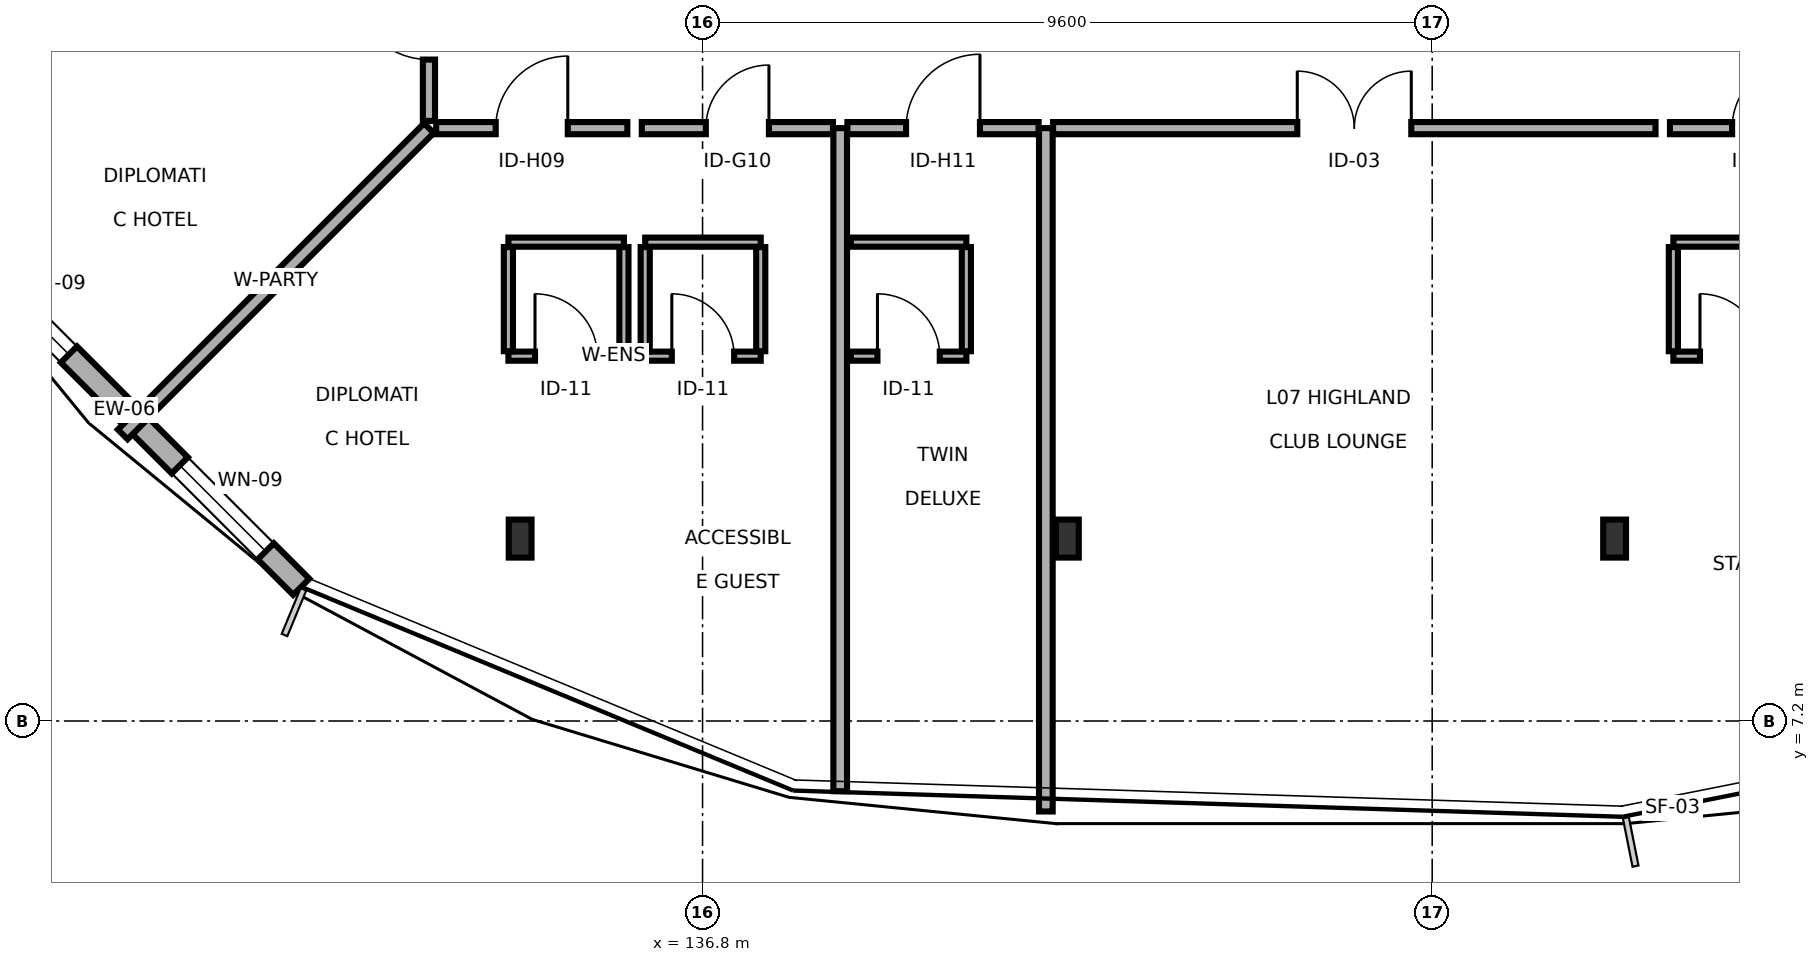
"""IFC4 building model, lengths in metres.
Left out: names, types, materials, properties, quantities, classifications, styles, units other than length and angle.
Written with IfcOpenShell. Run it as: python <this file> out.ifc"""

import sys

from ifc_helpers import new_model, si_unit, direction, frame, frame_2d, origin, origin_2d, place, context, subcontext, project, spatial, rectangle, i_section, extrude, element, fill, save


model = new_model("IFC4")
c1 = context("Model", 3, precision=1e-05, world=origin(), true_north=direction((0.0, 1.0)))
c2 = subcontext(c1, "Body", "Model", "MODEL_VIEW")
j1 = project(units=[si_unit("LENGTHUNIT", "METRE"), si_unit("PLANEANGLEUNIT", "RADIAN")], contexts=[c1])
p1 = place(None, origin())
s1 = spatial("IfcSite", under=j1, at=p1, CompositionType="ELEMENT")
p2 = place(p1, origin())
s2 = spatial("IfcBuilding", under=s1, at=p2, CompositionType="ELEMENT")
p3 = place(p2, frame((0.0, 0.0, 24.9)))
s3 = spatial("IfcBuildingStorey", under=s2, at=p3, CompositionType="ELEMENT", Elevation=24.9)
for number, where, z_axis, x_axis in (
    (1, (134.4, 9.6, 0.0), (0.0, 0.0, 1.0), (1.0, 0.0, 0.0)),
    (2, (141.6, 9.6, 0.0), (0.0, 0.0, 1.0), (1.0, 0.0, 0.0)),
    (3, (148.8, 9.6, 0.0), (0.0, 0.0, 1.0), (1.0, 0.0, 0.0)),
):
    element("IfcColumn", number, at=place(p3, frame(where, z_axis=z_axis, x_axis=x_axis)), inside=s3, PredefinedType="COLUMN", context=c2, shape_type="SweptSolid", body=[
        extrude(i_section(OverallWidth=0.3, OverallDepth=0.5, WebThickness=0.014, FlangeThickness=0.028, FilletRadius=0.027, at=origin_2d()), origin(), (0.0, 0.0, 1.0), 3.4),
    ])
p4 = place(p3, frame((126.566, 13.92, 0.0), z_axis=(0.0, 0.0, 1.0), x_axis=(0.707124205549, -0.707089356394, 0.0)))
e4 = element("IfcWall", 4, at=p4, inside=s3, PredefinedType="SOLIDWALL", context=c2, shape_type="SweptSolid", body=[
    extrude(rectangle(XDim=7.006, YDim=0.3, at=frame_2d((3.503, 0.0))), origin(), (0.0, 0.0, 1.0), 3.19),
])
p5 = place(p4, frame((4.746, 0.0, 0.8)))
e5 = element("IfcOpeningElement", 5, at=p5, cuts=e4, PredefinedType="OPENING", context=c2, shape_type="SweptSolid", body=[
    extrude(rectangle(XDim=1.6, YDim=1.5, at=frame_2d((0.8, 0.75))), frame((0.0, 0.16, 0.0), z_axis=(0.0, -1.0, 0.0), x_axis=(1.0, 0.0, 0.0)), (0.0, 0.0, 1.0), 0.32),
])
p6 = place(p4, frame((1.083, 0.0, 0.8)))
e6 = element("IfcOpeningElement", 6, at=p6, cuts=e4, PredefinedType="OPENING", context=c2, shape_type="SweptSolid", body=[
    extrude(rectangle(XDim=1.6, YDim=1.5, at=frame_2d((0.8, 0.75))), frame((0.0, 0.16, 0.0), z_axis=(0.0, -1.0, 0.0), x_axis=(1.0, 0.0, 0.0)), (0.0, 0.0, 1.0), 0.32),
])
p7 = place(p3, frame((141.412, 15.0, 0.0), z_axis=(0.0, 0.0, 1.0), x_axis=(1.0, 0.0, 0.0)))
e7 = element("IfcWall", 7, at=p7, inside=s3, PredefinedType="PARTITIONING", context=c2, shape_type="SweptSolid", body=[
    extrude(rectangle(XDim=7.927, YDim=0.16, at=frame_2d((3.963, 0.0))), origin(), (0.0, 0.0, 1.0), 2.725),
])
p8 = place(p7, frame((3.213, 0.0, 0.0)))
e8 = element("IfcOpeningElement", 8, at=p8, cuts=e7, PredefinedType="OPENING", context=c2, shape_type="SweptSolid", body=[
    extrude(rectangle(XDim=1.5, YDim=2.25, at=frame_2d((0.75, 1.125))), frame((0.0, 0.09, 0.0), z_axis=(0.0, -1.0, 0.0), x_axis=(1.0, 0.0, 0.0)), (0.0, 0.0, 1.0), 0.18),
])
p9 = place(p3, frame((133.295, 15.0, 0.0), z_axis=(0.0, 0.0, 1.0), x_axis=(1.0, 0.0, 0.0)))
e9 = element("IfcWall", 9, at=p9, inside=s3, PredefinedType="PARTITIONING", context=c2, shape_type="SweptSolid", body=[
    extrude(rectangle(XDim=2.516, YDim=0.16, at=frame_2d((1.258, 0.0))), origin(), (0.0, 0.0, 1.0), 3.19),
])
p10 = place(p9, frame((0.784, 0.0, 0.0)))
e10 = element("IfcOpeningElement", 10, at=p10, cuts=e9, PredefinedType="OPENING", context=c2, shape_type="SweptSolid", body=[
    extrude(rectangle(XDim=0.948, YDim=2.1, at=frame_2d((0.474, 1.05))), frame((0.0, 0.09, 0.0), z_axis=(0.0, -1.0, 0.0), x_axis=(1.0, 0.0, 0.0)), (0.0, 0.0, 1.0), 0.18),
])
p11 = place(p3, frame((134.246, 12.0, 0.0), z_axis=(0.0, 0.0, 1.0), x_axis=(1.0, 0.0, 0.0)))
e11 = element("IfcWall", 11, at=p11, inside=s3, PredefinedType="PARTITIONING", context=c2, shape_type="SweptSolid", body=[
    extrude(rectangle(XDim=1.52, YDim=0.12, at=frame_2d((0.76, 0.0))), origin(), (0.0, 0.0, 1.0), 2.725),
])
p12 = place(p11, frame((0.35, 0.0, 0.0)))
e12 = element("IfcOpeningElement", 12, at=p12, cuts=e11, PredefinedType="OPENING", context=c2, shape_type="SweptSolid", body=[
    extrude(rectangle(XDim=0.82, YDim=2.08, at=frame_2d((0.41, 1.04))), frame((0.0, 0.07, 0.0), z_axis=(0.0, -1.0, 0.0), x_axis=(1.0, 0.0, 0.0)), (0.0, 0.0, 1.0), 0.14),
])
p13 = place(p3, frame((134.246, 13.5, 0.0), z_axis=(0.0, 0.0, 1.0), x_axis=(1.0, 0.0, 0.0)))
e13 = element("IfcWall", 13, at=p13, inside=s3, PredefinedType="PARTITIONING", context=c2, shape_type="SweptSolid", body=[
    extrude(rectangle(XDim=1.52, YDim=0.12, at=frame_2d((0.76, 0.0))), origin(), (0.0, 0.0, 1.0), 2.725),
])
p14 = place(p3, frame((134.246, 12.065, 0.0), z_axis=(0.0, 0.0, 1.0), x_axis=(0.0, 1.0, 0.0)))
e14 = element("IfcWall", 14, at=p14, inside=s3, PredefinedType="PARTITIONING", context=c2, shape_type="SweptSolid", body=[
    extrude(rectangle(XDim=1.37, YDim=0.12, at=frame_2d((0.685, 0.0))), origin(), (0.0, 0.0, 1.0), 3.19),
])
p15 = place(p3, frame((135.766, 12.065, 0.0), z_axis=(0.0, 0.0, 1.0), x_axis=(0.0, 1.0, 0.0)))
e15 = element("IfcWall", 15, at=p15, inside=s3, PredefinedType="PARTITIONING", context=c2, shape_type="SweptSolid", body=[
    extrude(rectangle(XDim=1.37, YDim=0.12, at=frame_2d((0.685, 0.0))), origin(), (0.0, 0.0, 1.0), 2.725),
])
p16 = place(p3, frame((133.2, 15.0, 0.0), z_axis=(0.0, 0.0, 1.0), x_axis=(-0.707106781187, -0.707106781187, 0.0)))
e16 = element("IfcWall", 16, at=p16, inside=s3, PredefinedType="PARTITIONING", context=c2, shape_type="SweptSolid", body=[
    extrude(rectangle(XDim=5.698, YDim=0.18, at=frame_2d((2.849, 0.0))), origin(), (0.0, 0.0, 1.0), 2.675),
])
p17 = place(p3, frame((136.0, 15.0, 0.0), z_axis=(0.0, 0.0, 1.0), x_axis=(1.0, 0.0, 0.0)))
e17 = element("IfcWall", 17, at=p17, inside=s3, PredefinedType="PARTITIONING", context=c2, shape_type="SweptSolid", body=[
    extrude(rectangle(XDim=2.516, YDim=0.16, at=frame_2d((1.258, 0.0))), origin(), (0.0, 0.0, 1.0), 2.725),
])
p18 = place(p17, frame((0.843, 0.0, 0.0)))
e18 = element("IfcOpeningElement", 18, at=p18, cuts=e17, PredefinedType="OPENING", context=c2, shape_type="SweptSolid", body=[
    extrude(rectangle(XDim=0.83, YDim=2.11, at=frame_2d((0.415, 1.055))), frame((0.0, 0.09, 0.0), z_axis=(0.0, -1.0, 0.0), x_axis=(1.0, 0.0, 0.0)), (0.0, 0.0, 1.0), 0.18),
])
p19 = place(p3, frame((136.046, 12.0, 0.0), z_axis=(0.0, 0.0, 1.0), x_axis=(1.0, 0.0, 0.0)))
e19 = element("IfcWall", 19, at=p19, inside=s3, PredefinedType="PARTITIONING", context=c2, shape_type="SweptSolid", body=[
    extrude(rectangle(XDim=1.52, YDim=0.12, at=frame_2d((0.76, 0.0))), origin(), (0.0, 0.0, 1.0), 3.19),
])
p20 = place(p19, frame((0.35, 0.0, 0.0)))
e20 = element("IfcOpeningElement", 20, at=p20, cuts=e19, PredefinedType="OPENING", context=c2, shape_type="SweptSolid", body=[
    extrude(rectangle(XDim=0.82, YDim=2.08, at=frame_2d((0.41, 1.04))), frame((0.0, 0.07, 0.0), z_axis=(0.0, -1.0, 0.0), x_axis=(1.0, 0.0, 0.0)), (0.0, 0.0, 1.0), 0.14),
])
p21 = place(p3, frame((136.046, 13.5, 0.0), z_axis=(0.0, 0.0, 1.0), x_axis=(1.0, 0.0, 0.0)))
e21 = element("IfcWall", 21, at=p21, inside=s3, PredefinedType="PARTITIONING", context=c2, shape_type="SweptSolid", body=[
    extrude(rectangle(XDim=1.52, YDim=0.12, at=frame_2d((0.76, 0.0))), origin(), (0.0, 0.0, 1.0), 3.19),
])
for number, where, z_axis, x_axis in (
    (22, (136.046, 12.065, 0.0), (0.0, 0.0, 1.0), (0.0, 1.0, 0.0)),
    (23, (137.566, 12.065, 0.0), (0.0, 0.0, 1.0), (0.0, 1.0, 0.0)),
):
    element("IfcWall", number, at=place(p3, frame(where, z_axis=z_axis, x_axis=x_axis)), inside=s3, PredefinedType="PARTITIONING", context=c2, shape_type="SweptSolid", body=[
        extrude(rectangle(XDim=1.37, YDim=0.12, at=frame_2d((0.685, 0.0))), origin(), (0.0, 0.0, 1.0), 3.19),
    ])
p22 = place(p3, frame((138.611, 6.277, 0.0), z_axis=(0.0, 0.0, 1.0), x_axis=(0.0, 1.0, 0.0)))
e24 = element("IfcWall", 24, at=p22, inside=s3, PredefinedType="PARTITIONING", context=c2, shape_type="SweptSolid", body=[
    extrude(rectangle(XDim=8.723, YDim=0.18, at=frame_2d((4.362, 0.0))), origin(), (0.0, 0.0, 1.0), 2.675),
])
p23 = place(p3, frame((138.706, 15.0, 0.0), z_axis=(0.0, 0.0, 1.0), x_axis=(1.0, 0.0, 0.0)))
e25 = element("IfcWall", 25, at=p23, inside=s3, PredefinedType="PARTITIONING", context=c2, shape_type="SweptSolid", body=[
    extrude(rectangle(XDim=2.516, YDim=0.16, at=frame_2d((1.258, 0.0))), origin(), (0.0, 0.0, 1.0), 3.19),
])
p24 = place(p23, frame((0.772, 0.0, 0.0)))
e26 = element("IfcOpeningElement", 26, at=p24, cuts=e25, PredefinedType="OPENING", context=c2, shape_type="SweptSolid", body=[
    extrude(rectangle(XDim=0.972, YDim=2.16, at=frame_2d((0.486, 1.08))), frame((0.0, 0.09, 0.0), z_axis=(0.0, -1.0, 0.0), x_axis=(1.0, 0.0, 0.0)), (0.0, 0.0, 1.0), 0.18),
])
p25 = place(p3, frame((138.751, 12.0, 0.0), z_axis=(0.0, 0.0, 1.0), x_axis=(1.0, 0.0, 0.0)))
e27 = element("IfcWall", 27, at=p25, inside=s3, PredefinedType="PARTITIONING", context=c2, shape_type="SweptSolid", body=[
    extrude(rectangle(XDim=1.52, YDim=0.12, at=frame_2d((0.76, 0.0))), origin(), (0.0, 0.0, 1.0), 3.19),
])
p26 = place(p25, frame((0.35, 0.0, 0.0)))
e28 = element("IfcOpeningElement", 28, at=p26, cuts=e27, PredefinedType="OPENING", context=c2, shape_type="SweptSolid", body=[
    extrude(rectangle(XDim=0.82, YDim=2.08, at=frame_2d((0.41, 1.04))), frame((0.0, 0.07, 0.0), z_axis=(0.0, -1.0, 0.0), x_axis=(1.0, 0.0, 0.0)), (0.0, 0.0, 1.0), 0.14),
])
p27 = place(p3, frame((138.751, 13.5, 0.0), z_axis=(0.0, 0.0, 1.0), x_axis=(1.0, 0.0, 0.0)))
e29 = element("IfcWall", 29, at=p27, inside=s3, PredefinedType="PARTITIONING", context=c2, shape_type="SweptSolid", body=[
    extrude(rectangle(XDim=1.52, YDim=0.12, at=frame_2d((0.76, 0.0))), origin(), (0.0, 0.0, 1.0), 3.19),
])
p28 = place(p3, frame((140.271, 12.065, 0.0), z_axis=(0.0, 0.0, 1.0), x_axis=(0.0, 1.0, 0.0)))
e30 = element("IfcWall", 30, at=p28, inside=s3, PredefinedType="PARTITIONING", context=c2, shape_type="SweptSolid", body=[
    extrude(rectangle(XDim=1.37, YDim=0.12, at=frame_2d((0.685, 0.0))), origin(), (0.0, 0.0, 1.0), 3.19),
])
p29 = place(p3, frame((141.317, 6.01, 0.0), z_axis=(0.0, 0.0, 1.0), x_axis=(0.0, 1.0, 0.0)))
e31 = element("IfcWall", 31, at=p29, inside=s3, PredefinedType="PARTITIONING", context=c2, shape_type="SweptSolid", body=[
    extrude(rectangle(XDim=8.99, YDim=0.18, at=frame_2d((4.495, 0.0))), origin(), (0.0, 0.0, 1.0), 2.675),
])
p30 = place(p3, frame((149.528, 15.0, 0.0), z_axis=(0.0, 0.0, 1.0), x_axis=(1.0, 0.0, 0.0)))
e32 = element("IfcWall", 32, at=p30, inside=s3, PredefinedType="PARTITIONING", context=c2, shape_type="SweptSolid", body=[
    extrude(rectangle(XDim=2.516, YDim=0.16, at=frame_2d((1.258, 0.0))), origin(), (0.0, 0.0, 1.0), 3.19),
])
p31 = place(p30, frame((0.818, 0.0, 0.0)))
e33 = element("IfcOpeningElement", 33, at=p31, cuts=e32, PredefinedType="OPENING", context=c2, shape_type="SweptSolid", body=[
    extrude(rectangle(XDim=0.88, YDim=2.05, at=frame_2d((0.44, 1.025))), frame((0.0, 0.09, 0.0), z_axis=(0.0, -1.0, 0.0), x_axis=(1.0, 0.0, 0.0)), (0.0, 0.0, 1.0), 0.18),
])
p32 = place(p3, frame((149.573, 12.0, 0.0), z_axis=(0.0, 0.0, 1.0), x_axis=(1.0, 0.0, 0.0)))
e34 = element("IfcWall", 34, at=p32, inside=s3, PredefinedType="PARTITIONING", context=c2, shape_type="SweptSolid", body=[
    extrude(rectangle(XDim=1.52, YDim=0.12, at=frame_2d((0.76, 0.0))), origin(), (0.0, 0.0, 1.0), 3.19),
])
p33 = place(p32, frame((0.35, 0.0, 0.0)))
e35 = element("IfcOpeningElement", 35, at=p33, cuts=e34, PredefinedType="OPENING", context=c2, shape_type="SweptSolid", body=[
    extrude(rectangle(XDim=0.82, YDim=2.08, at=frame_2d((0.41, 1.04))), frame((0.0, 0.07, 0.0), z_axis=(0.0, -1.0, 0.0), x_axis=(1.0, 0.0, 0.0)), (0.0, 0.0, 1.0), 0.14),
])
p34 = place(p3, frame((149.573, 13.5, 0.0), z_axis=(0.0, 0.0, 1.0), x_axis=(1.0, 0.0, 0.0)))
e36 = element("IfcWall", 36, at=p34, inside=s3, PredefinedType="PARTITIONING", context=c2, shape_type="SweptSolid", body=[
    extrude(rectangle(XDim=1.52, YDim=0.12, at=frame_2d((0.76, 0.0))), origin(), (0.0, 0.0, 1.0), 3.19),
])
p35 = place(p3, frame((149.573, 12.065, 0.0), z_axis=(0.0, 0.0, 1.0), x_axis=(0.0, 1.0, 0.0)))
e37 = element("IfcWall", 37, at=p35, inside=s3, PredefinedType="PARTITIONING", context=c2, shape_type="SweptSolid", body=[
    extrude(rectangle(XDim=1.37, YDim=0.12, at=frame_2d((0.685, 0.0))), origin(), (0.0, 0.0, 1.0), 3.19),
])
p36 = place(p3, frame((133.2, 15.095, 0.0), z_axis=(0.0, 0.0, 1.0), x_axis=(0.0, 1.0, 0.0)))
e38 = element("IfcWall", 38, at=p36, inside=s3, PredefinedType="PARTITIONING", context=c2, shape_type="SweptSolid", body=[
    extrude(rectangle(XDim=2.61, YDim=0.16, at=frame_2d((1.305, 0.0))), origin(), (0.0, 0.0, 1.0), 2.725),
])
p37 = place(p36, frame((0.807, 0.0, 0.0)))
e39 = element("IfcOpeningElement", 39, at=p37, cuts=e38, PredefinedType="OPENING", context=c2, shape_type="SweptSolid", body=[
    extrude(rectangle(XDim=0.996, YDim=2.1, at=frame_2d((0.498, 1.05))), frame((0.0, 0.09, 0.0), z_axis=(0.0, -1.0, 0.0), x_axis=(1.0, 0.0, 0.0)), (0.0, 0.0, 1.0), 0.18),
])
p38 = place(p5, origin())
e40 = element("IfcWindow", 40, at=p38, inside=s3, PartitioningType="SINGLE_PANEL", PredefinedType="WINDOW", context=c2, shape_type="SweptSolid", body=[
    extrude(rectangle(XDim=1.6, YDim=1.5, at=frame_2d((0.8, 0.75))), frame((0.0, 0.03, 0.0), z_axis=(0.0, -1.0, 0.0), x_axis=(1.0, 0.0, 0.0)), (0.0, 0.0, 1.0), 0.06),
])
fill(e5, e40)
p39 = place(p6, origin())
e41 = element("IfcWindow", 41, at=p39, inside=s3, PartitioningType="SINGLE_PANEL", PredefinedType="WINDOW", context=c2, shape_type="SweptSolid", body=[
    extrude(rectangle(XDim=1.6, YDim=1.5, at=frame_2d((0.8, 0.75))), frame((0.0, 0.03, 0.0), z_axis=(0.0, -1.0, 0.0), x_axis=(1.0, 0.0, 0.0)), (0.0, 0.0, 1.0), 0.06),
])
fill(e6, e41)
p40 = place(p8, origin())
e42 = element("IfcDoor", 42, at=p40, inside=s3, OperationType="DOUBLE_DOOR_SINGLE_SWING", PredefinedType="DOOR", context=c2, shape_type="SweptSolid", body=[
    extrude(rectangle(XDim=1.5, YDim=2.25, at=frame_2d((0.75, 1.125))), frame((0.0, 0.025, 0.0), z_axis=(0.0, -1.0, 0.0), x_axis=(1.0, 0.0, 0.0)), (0.0, 0.0, 1.0), 0.05),
])
fill(e8, e42)
p41 = place(p10, origin())
e43 = element("IfcDoor", 43, at=p41, inside=s3, OperationType="SINGLE_SWING_RIGHT", PredefinedType="DOOR", context=c2, shape_type="SweptSolid", body=[
    extrude(rectangle(XDim=0.948, YDim=2.1, at=frame_2d((0.474, 1.05))), frame((0.0, 0.025, 0.0), z_axis=(0.0, -1.0, 0.0), x_axis=(1.0, 0.0, 0.0)), (0.0, 0.0, 1.0), 0.05),
])
fill(e10, e43)
p42 = place(p12, origin())
e44 = element("IfcDoor", 44, at=p42, inside=s3, OperationType="SINGLE_SWING_LEFT", PredefinedType="DOOR", context=c2, shape_type="SweptSolid", body=[
    extrude(rectangle(XDim=0.82, YDim=2.08, at=frame_2d((0.41, 1.04))), frame((0.0, 0.025, 0.0), z_axis=(0.0, -1.0, 0.0), x_axis=(1.0, 0.0, 0.0)), (0.0, 0.0, 1.0), 0.05),
])
fill(e12, e44)
p43 = place(p18, origin())
e45 = element("IfcDoor", 45, at=p43, inside=s3, OperationType="SINGLE_SWING_RIGHT", PredefinedType="DOOR", context=c2, shape_type="SweptSolid", body=[
    extrude(rectangle(XDim=0.83, YDim=2.11, at=frame_2d((0.415, 1.055))), frame((0.0, 0.025, 0.0), z_axis=(0.0, -1.0, 0.0), x_axis=(1.0, 0.0, 0.0)), (0.0, 0.0, 1.0), 0.05),
])
fill(e18, e45)
p44 = place(p20, origin())
e46 = element("IfcDoor", 46, at=p44, inside=s3, OperationType="SINGLE_SWING_LEFT", PredefinedType="DOOR", context=c2, shape_type="SweptSolid", body=[
    extrude(rectangle(XDim=0.82, YDim=2.08, at=frame_2d((0.41, 1.04))), frame((0.0, 0.025, 0.0), z_axis=(0.0, -1.0, 0.0), x_axis=(1.0, 0.0, 0.0)), (0.0, 0.0, 1.0), 0.05),
])
fill(e20, e46)
p45 = place(p24, origin())
e47 = element("IfcDoor", 47, at=p45, inside=s3, OperationType="SINGLE_SWING_RIGHT", PredefinedType="DOOR", context=c2, shape_type="SweptSolid", body=[
    extrude(rectangle(XDim=0.972, YDim=2.16, at=frame_2d((0.486, 1.08))), frame((0.0, 0.025, 0.0), z_axis=(0.0, -1.0, 0.0), x_axis=(1.0, 0.0, 0.0)), (0.0, 0.0, 1.0), 0.05),
])
fill(e26, e47)
p46 = place(p26, origin())
e48 = element("IfcDoor", 48, at=p46, inside=s3, OperationType="SINGLE_SWING_LEFT", PredefinedType="DOOR", context=c2, shape_type="SweptSolid", body=[
    extrude(rectangle(XDim=0.82, YDim=2.08, at=frame_2d((0.41, 1.04))), frame((0.0, 0.025, 0.0), z_axis=(0.0, -1.0, 0.0), x_axis=(1.0, 0.0, 0.0)), (0.0, 0.0, 1.0), 0.05),
])
fill(e28, e48)
p47 = place(p31, origin())
e49 = element("IfcDoor", 49, at=p47, inside=s3, OperationType="SINGLE_SWING_RIGHT", PredefinedType="DOOR", context=c2, shape_type="SweptSolid", body=[
    extrude(rectangle(XDim=0.88, YDim=2.05, at=frame_2d((0.44, 1.025))), frame((0.0, 0.025, 0.0), z_axis=(0.0, -1.0, 0.0), x_axis=(1.0, 0.0, 0.0)), (0.0, 0.0, 1.0), 0.05),
])
fill(e33, e49)
p48 = place(p33, origin())
e50 = element("IfcDoor", 50, at=p48, inside=s3, OperationType="SINGLE_SWING_LEFT", PredefinedType="DOOR", context=c2, shape_type="SweptSolid", body=[
    extrude(rectangle(XDim=0.82, YDim=2.08, at=frame_2d((0.41, 1.04))), frame((0.0, 0.025, 0.0), z_axis=(0.0, -1.0, 0.0), x_axis=(1.0, 0.0, 0.0)), (0.0, 0.0, 1.0), 0.05),
])
fill(e35, e50)
p49 = place(p37, origin())
e51 = element("IfcDoor", 51, at=p49, inside=s3, OperationType="SINGLE_SWING_RIGHT", PredefinedType="DOOR", context=c2, shape_type="SweptSolid", body=[
    extrude(rectangle(XDim=0.996, YDim=2.1, at=frame_2d((0.498, 1.05))), frame((0.0, 0.025, 0.0), z_axis=(0.0, -1.0, 0.0), x_axis=(1.0, 0.0, 0.0)), (0.0, 0.0, 1.0), 0.05),
])
fill(e39, e51)
save(model, sys.argv[1])
